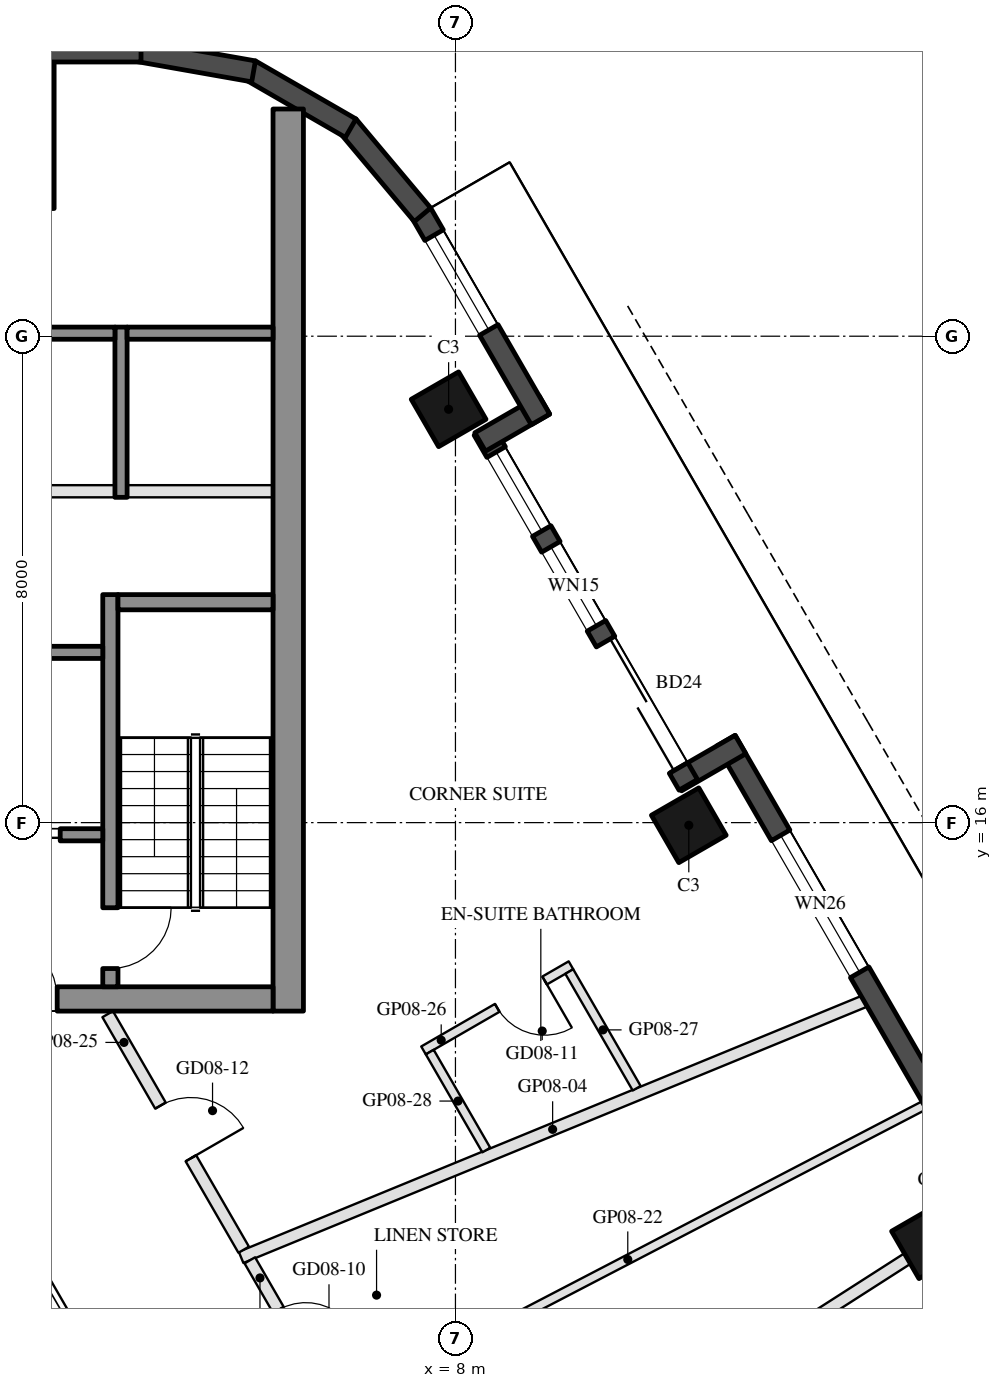
"""IFC4 building model, lengths in metres.
Left out: names, types, materials, properties, quantities, classifications, styles, units other than length and angle.
Written with IfcOpenShell. Run it as: python <this file> out.ifc"""

import sys

from ifc_helpers import new_model, si_unit, direction, frame, frame_2d, origin, origin_2d, place, context, subcontext, project, spatial, rectangle, hollow_rectangle, extrude, element, fill, save


model = new_model("IFC4")
c1 = context("Model", 3, precision=1e-05, world=origin(), true_north=direction((0.0, 1.0)))
c2 = subcontext(c1, "Body", "Model", "MODEL_VIEW")
j1 = project(units=[si_unit("LENGTHUNIT", "METRE"), si_unit("PLANEANGLEUNIT", "RADIAN")], contexts=[c1])
p1 = place(None, origin())
s1 = spatial("IfcSite", under=j1, at=p1, CompositionType="ELEMENT")
p2 = place(p1, origin())
s2 = spatial("IfcBuilding", under=s1, at=p2, CompositionType="ELEMENT")
p3 = place(p2, frame((0.0, 0.0, 105.7)))
s3 = spatial("IfcBuildingStorey", under=s2, at=p3, CompositionType="ELEMENT", Elevation=105.7)
for number, where, z_axis, x_axis in (
    (1, (15.788, 9.115, 0.0), (0.0, 0.0, 1.0), (-0.5, 0.866, 0.0)),
    (2, (11.838, 15.957, 0.0), (0.0, 0.0, 1.0), (-0.5, 0.866, 0.0)),
    (3, (7.888, 22.798, 0.0), (0.0, 0.0, 1.0), (-0.5, 0.866, 0.0)),
):
    element("IfcColumn", number, at=place(p3, frame(where, z_axis=z_axis, x_axis=x_axis)), inside=s3, PredefinedType="COLUMN", context=c2, shape_type="SweptSolid", body=[
        extrude(hollow_rectangle(XDim=0.9, YDim=0.9, WallThickness=0.04, at=origin_2d()), origin(), (0.0, 0.0, 1.0), 3.7),
    ])
p4 = place(p3, frame((0.0, 27.3, 0.0), z_axis=(0.0, 0.0, 1.0), x_axis=(1.0, 0.0, 0.0)))
e4 = element("IfcColumn", 4, at=p4, inside=s3, PredefinedType="COLUMN", context=c2, shape_type="SweptSolid", body=[
    extrude(hollow_rectangle(XDim=2.8, YDim=2.4, WallThickness=0.07, at=origin_2d()), origin(), (0.0, 0.0, 1.0), 3.7),
])
p5 = place(p3, frame((17.299, 8.948, 0.0), z_axis=(0.0, 0.0, 1.0), x_axis=(-0.500010041276, 0.866019606374, 0.0)))
e5 = element("IfcWall", 5, at=p5, inside=s3, PredefinedType="SOLIDWALL", context=c2, shape_type="SweptSolid", body=[
    extrude(rectangle(XDim=9.7, YDim=0.35, at=frame_2d((4.85, 0.0))), origin(), (0.0, 0.0, 1.0), 3.55),
])
p6 = place(p5, frame((5.301, 0.0, 0.3)))
e6 = element("IfcOpeningElement", 6, at=p6, cuts=e5, PredefinedType="OPENING", context=c2, shape_type="SweptSolid", body=[
    extrude(rectangle(XDim=2.6, YDim=2.65, at=frame_2d((1.3, 1.325))), frame((0.0, 0.185, 0.0), z_axis=(0.0, -1.0, 0.0), x_axis=(1.0, 0.0, 0.0)), (0.0, 0.0, 1.0), 0.37),
])
p7 = place(p3, frame((12.688, 17.284, 0.0), z_axis=(0.0, 0.0, 1.0), x_axis=(-0.865955602162, -0.500120880472, 0.0)))
e7 = element("IfcWall", 7, at=p7, inside=s3, PredefinedType="SOLIDWALL", context=c2, shape_type="SweptSolid", body=[
    extrude(rectangle(XDim=1.22, YDim=0.35, at=frame_2d((0.61, 0.0))), origin(), (0.0, 0.0, 1.0), 3.55),
])
p8 = place(p3, frame((11.829, 16.621, 0.0), z_axis=(0.0, 0.0, 1.0), x_axis=(-0.500003597184, 0.866023326939, 0.0)))
e8 = element("IfcWall", 8, at=p8, inside=s3, PredefinedType="SOLIDWALL", context=c2, shape_type="SweptSolid", body=[
    extrude(rectangle(XDim=6.74, YDim=0.35, at=frame_2d((3.37, 0.0))), origin(), (0.0, 0.0, 1.0), 3.55),
])
p9 = place(p8, frame((0.32, 0.0, 0.0)))
e9 = element("IfcOpeningElement", 9, at=p9, cuts=e8, PredefinedType="OPENING", context=c2, shape_type="SweptSolid", body=[
    extrude(rectangle(XDim=2.4, YDim=2.4, at=frame_2d((1.2, 1.2))), frame((0.0, 0.185, 0.0), z_axis=(0.0, -1.0, 0.0), x_axis=(1.0, 0.0, 0.0)), (0.0, 0.0, 1.0), 0.37),
])
p10 = place(p8, frame((3.02, 0.0, 0.3)))
e10 = element("IfcOpeningElement", 10, at=p10, cuts=e8, PredefinedType="OPENING", context=c2, shape_type="SweptSolid", body=[
    extrude(rectangle(XDim=1.5, YDim=2.65, at=frame_2d((0.75, 1.325))), frame((0.0, 0.185, 0.0), z_axis=(0.0, -1.0, 0.0), x_axis=(1.0, 0.0, 0.0)), (0.0, 0.0, 1.0), 0.37),
])
p11 = place(p8, frame((4.82, 0.0, 0.3)))
e11 = element("IfcOpeningElement", 11, at=p11, cuts=e8, PredefinedType="OPENING", context=c2, shape_type="SweptSolid", body=[
    extrude(rectangle(XDim=1.5, YDim=2.65, at=frame_2d((0.75, 1.325))), frame((0.0, 0.185, 0.0), z_axis=(0.0, -1.0, 0.0), x_axis=(1.0, 0.0, 0.0)), (0.0, 0.0, 1.0), 0.37),
])
p12 = place(p3, frame((8.406, 22.26, 0.0), z_axis=(0.0, 0.0, 1.0), x_axis=(0.865955602162, 0.500120880472, 0.0)))
e12 = element("IfcWall", 12, at=p12, inside=s3, PredefinedType="SOLIDWALL", context=c2, shape_type="SweptSolid", body=[
    extrude(rectangle(XDim=1.22, YDim=0.35, at=frame_2d((0.61, 0.0))), origin(), (0.0, 0.0, 1.0), 3.55),
])
p13 = place(p3, frame((9.398, 22.631, 0.0), z_axis=(0.0, 0.0, 1.0), x_axis=(-0.499954521343, 0.866051659307, 0.0)))
e13 = element("IfcWall", 13, at=p13, inside=s3, PredefinedType="SOLIDWALL", context=c2, shape_type="SweptSolid", body=[
    extrude(rectangle(XDim=3.916, YDim=0.35, at=frame_2d((1.958, 0.0))), origin(), (0.0, 0.0, 1.0), 3.55),
])
p14 = place(p13, frame((1.7, 0.0, 0.3)))
e14 = element("IfcOpeningElement", 14, at=p14, cuts=e13, PredefinedType="OPENING", context=c2, shape_type="SweptSolid", body=[
    extrude(rectangle(XDim=1.8, YDim=2.65, at=frame_2d((0.9, 1.325))), frame((0.0, 0.185, 0.0), z_axis=(0.0, -1.0, 0.0), x_axis=(1.0, 0.0, 0.0)), (0.0, 0.0, 1.0), 0.37),
])
p15 = place(p3, frame((7.458, 25.998, 0.0), z_axis=(0.0, 0.0, 1.0), x_axis=(-0.642808304945, 0.766027077259, 0.0)))
e15 = element("IfcWall", 15, at=p15, inside=s3, PredefinedType="SOLIDWALL", context=c2, shape_type="SweptSolid", body=[
    extrude(rectangle(XDim=1.91, YDim=0.35, at=frame_2d((0.955, 0.0))), origin(), (0.0, 0.0, 1.0), 3.55),
])
for number, where, z_axis, x_axis in (
    (16, (6.277, 27.422, 0.0), (0.0, 0.0, 1.0), (-0.866, 0.5, 0.0)),
    (17, (4.68, 28.356, 0.0), (0.0, 0.0, 1.0), (-0.985, 0.174, 0.0)),
):
    element("IfcWall", number, at=place(p3, frame(where, z_axis=z_axis, x_axis=x_axis)), inside=s3, PredefinedType="SOLIDWALL", context=c2, shape_type="SweptSolid", body=[
        extrude(rectangle(XDim=1.91, YDim=0.35, at=frame_2d((0.955, 0.0))), origin(), (0.0, 0.0, 1.0), 3.55),
    ])
p16 = place(p3, frame((2.829, 28.685, 0.0), z_axis=(0.0, 0.0, 1.0), x_axis=(-1.0, 0.0, 0.0)))
e18 = element("IfcWall", 18, at=p16, inside=s3, PredefinedType="SOLIDWALL", context=c2, shape_type="SweptSolid", body=[
    extrude(rectangle(XDim=5.658, YDim=0.35, at=frame_2d((2.829, 0.0))), origin(), (0.0, 0.0, 1.0), 3.55),
])
p17 = place(p3, frame((5.25, 12.9, 0.0), z_axis=(0.0, 0.0, 1.0), x_axis=(0.0, 1.0, 0.0)))
e19 = element("IfcWall", 19, at=p17, inside=s3, PredefinedType="SHEAR", context=c2, shape_type="SweptSolid", body=[
    extrude(rectangle(XDim=14.837, YDim=0.5, at=frame_2d((7.418, 0.0))), origin(), (0.0, 0.0, 1.0), 3.5),
])
p18 = place(p3, frame((5.0, 13.1, 0.0), z_axis=(0.0, 0.0, 1.0), x_axis=(-1.0, 0.0, 0.0)))
e20 = element("IfcWall", 20, at=p18, inside=s3, PredefinedType="SHEAR", context=c2, shape_type="SweptSolid", body=[
    extrude(rectangle(XDim=10.0, YDim=0.4, at=frame_2d((5.0, 0.0))), origin(), (0.0, 0.0, 1.0), 3.5),
])
p19 = place(p18, frame((3.55, 0.0, 0.0)))
e21 = element("IfcOpeningElement", 21, at=p19, cuts=e20, PredefinedType="OPENING", context=c2, shape_type="SweptSolid", body=[
    extrude(rectangle(XDim=1.1, YDim=2.1, at=frame_2d((0.55, 1.05))), frame((0.0, 0.21, 0.0), z_axis=(0.0, -1.0, 0.0), x_axis=(1.0, 0.0, 0.0)), (0.0, 0.0, 1.0), 0.42),
])
p20 = place(p18, frame((5.85, 0.0, 0.0)))
e22 = element("IfcOpeningElement", 22, at=p20, cuts=e20, PredefinedType="OPENING", context=c2, shape_type="SweptSolid", body=[
    extrude(rectangle(XDim=1.4, YDim=2.1, at=frame_2d((0.7, 1.05))), frame((0.0, 0.21, 0.0), z_axis=(0.0, -1.0, 0.0), x_axis=(1.0, 0.0, 0.0)), (0.0, 0.0, 1.0), 0.42),
])
p21 = place(p3, frame((2.325, 13.3, 0.0), z_axis=(0.0, 0.0, 1.0), x_axis=(0.0, 1.0, 0.0)))
e23 = element("IfcWall", 23, at=p21, inside=s3, PredefinedType="SHEAR", context=c2, shape_type="SweptSolid", body=[
    extrude(rectangle(XDim=6.45, YDim=0.25, at=frame_2d((3.225, 0.0))), origin(), (0.0, 0.0, 1.0), 3.5),
])
p22 = place(p21, frame((0.3, 0.0, 0.0)))
e24 = element("IfcOpeningElement", 24, at=p22, cuts=e23, PredefinedType="OPENING", context=c2, shape_type="SweptSolid", body=[
    extrude(rectangle(XDim=1.0, YDim=2.1, at=frame_2d((0.5, 1.05))), frame((0.0, 0.135, 0.0), z_axis=(0.0, -1.0, 0.0), x_axis=(1.0, 0.0, 0.0)), (0.0, 0.0, 1.0), 0.27),
])
p23 = place(p3, frame((5.0, 19.625, 0.0), z_axis=(0.0, 0.0, 1.0), x_axis=(-1.0, 0.0, 0.0)))
e25 = element("IfcWall", 25, at=p23, inside=s3, PredefinedType="SHEAR", context=c2, shape_type="SweptSolid", body=[
    extrude(rectangle(XDim=2.55, YDim=0.25, at=frame_2d((1.275, 0.0))), origin(), (0.0, 0.0, 1.0), 3.5),
])
p24 = place(p3, frame((2.2, 18.8, 0.0), z_axis=(0.0, 0.0, 1.0), x_axis=(-1.0, 0.0, 0.0)))
e26 = element("IfcWall", 26, at=p24, inside=s3, PredefinedType="SHEAR", context=c2, shape_type="SweptSolid", body=[
    extrude(rectangle(XDim=2.8, YDim=0.2, at=frame_2d((1.4, 0.0))), origin(), (0.0, 0.0, 1.0), 3.5),
])
p25 = place(p3, frame((2.2, 15.8, 0.0), z_axis=(0.0, 0.0, 1.0), x_axis=(-1.0, 0.0, 0.0)))
e27 = element("IfcWall", 27, at=p25, inside=s3, PredefinedType="SHEAR", context=c2, shape_type="SweptSolid", body=[
    extrude(rectangle(XDim=2.8, YDim=0.2, at=frame_2d((1.4, 0.0))), origin(), (0.0, 0.0, 1.0), 3.5),
])
p26 = place(p25, frame((0.7, 0.0, 0.0)))
e28 = element("IfcOpeningElement", 28, at=p26, cuts=e27, PredefinedType="OPENING", context=c2, shape_type="SweptSolid", body=[
    extrude(rectangle(XDim=1.2, YDim=2.1, at=frame_2d((0.6, 1.05))), frame((0.0, 0.11, 0.0), z_axis=(0.0, -1.0, 0.0), x_axis=(1.0, 0.0, 0.0)), (0.0, 0.0, 1.0), 0.22),
])
p27 = place(p3, frame((2.5, 21.35, 0.0), z_axis=(0.0, 0.0, 1.0), x_axis=(0.0, 1.0, 0.0)))
e29 = element("IfcWall", 29, at=p27, inside=s3, PredefinedType="SHEAR", context=c2, shape_type="SweptSolid", body=[
    extrude(rectangle(XDim=2.8, YDim=0.2, at=frame_2d((1.4, 0.0))), origin(), (0.0, 0.0, 1.0), 3.5),
])
p28 = place(p3, frame((5.0, 24.05, 0.0), z_axis=(0.0, 0.0, 1.0), x_axis=(-1.0, 0.0, 0.0)))
e30 = element("IfcWall", 30, at=p28, inside=s3, PredefinedType="SHEAR", context=c2, shape_type="SweptSolid", body=[
    extrude(rectangle(XDim=2.4, YDim=0.2, at=frame_2d((1.2, 0.0))), origin(), (0.0, 0.0, 1.0), 3.5),
])
p29 = place(p3, frame((2.4, 24.05, 0.0), z_axis=(0.0, 0.0, 1.0), x_axis=(-1.0, 0.0, 0.0)))
e31 = element("IfcWall", 31, at=p29, inside=s3, PredefinedType="SHEAR", context=c2, shape_type="SweptSolid", body=[
    extrude(rectangle(XDim=2.8, YDim=0.2, at=frame_2d((1.4, 0.0))), origin(), (0.0, 0.0, 1.0), 3.5),
])
p30 = place(p3, frame((5.0, 21.45, 0.0), z_axis=(0.0, 0.0, 1.0), x_axis=(-1.0, 0.0, 0.0)))
e32 = element("IfcWall", 32, at=p30, inside=s3, PredefinedType="PARTITIONING", context=c2, shape_type="SweptSolid", body=[
    extrude(rectangle(XDim=2.4, YDim=0.2, at=frame_2d((1.2, 0.0))), origin(), (0.0, 0.0, 1.0), 3.5),
])
p31 = place(p3, frame((2.4, 21.45, 0.0), z_axis=(0.0, 0.0, 1.0), x_axis=(-1.0, 0.0, 0.0)))
e33 = element("IfcWall", 33, at=p31, inside=s3, PredefinedType="PARTITIONING", context=c2, shape_type="SweptSolid", body=[
    extrude(rectangle(XDim=2.8, YDim=0.2, at=frame_2d((1.4, 0.0))), origin(), (0.0, 0.0, 1.0), 3.5),
])
p32 = place(p3, frame((15.433, 8.83, 0.0), z_axis=(0.0, 0.0, 1.0), x_axis=(-0.841935777146, -0.539577748949, 0.0)))
e34 = element("IfcWall", 34, at=p32, inside=s3, PredefinedType="PARTITIONING", context=c2, shape_type="SweptSolid", body=[
    extrude(rectangle(XDim=9.49, YDim=0.2, at=frame_2d((4.745, 0.0))), origin(), (0.0, 0.0, 1.0), 2.95),
])
p33 = place(p3, frame((14.722, 13.061, 0.0), z_axis=(0.0, 0.0, 1.0), x_axis=(-0.9249494111, -0.380090235214, 0.0)))
e35 = element("IfcWall", 35, at=p33, inside=s3, PredefinedType="PARTITIONING", context=c2, shape_type="SweptSolid", body=[
    extrude(rectangle(XDim=11.079, YDim=0.2, at=frame_2d((5.54, 0.0))), origin(), (0.0, 0.0, 1.0), 2.95),
])
p34 = place(p3, frame((15.709, 11.35, 0.0), z_axis=(0.0, 0.0, 1.0), x_axis=(-0.887196797294, -0.461391203721, 0.0)))
e36 = element("IfcWall", 36, at=p34, inside=s3, PredefinedType="PARTITIONING", context=c2, shape_type="SweptSolid", body=[
    extrude(rectangle(XDim=10.991, YDim=0.15, at=frame_2d((5.495, 0.0))), origin(), (0.0, 0.0, 1.0), 2.96),
])
p35 = place(p3, frame((4.618, 8.801, 0.0), z_axis=(0.0, 0.0, 1.0), x_axis=(0.499988210251, -0.866032210492, 0.0)))
e37 = element("IfcWall", 37, at=p35, inside=s3, PredefinedType="PARTITIONING", context=c2, shape_type="SweptSolid", body=[
    extrude(rectangle(XDim=2.783, YDim=0.2, at=frame_2d((1.392, 0.0))), origin(), (0.0, 0.0, 1.0), 2.95),
])
p36 = place(p35, frame((0.942, 0.0, 0.0)))
e38 = element("IfcOpeningElement", 38, at=p36, cuts=e37, PredefinedType="OPENING", context=c2, shape_type="SweptSolid", body=[
    extrude(rectangle(XDim=0.9, YDim=2.1, at=frame_2d((0.45, 1.05))), frame((0.0, 0.11, 0.0), z_axis=(0.0, -1.0, 0.0), x_axis=(1.0, 0.0, 0.0)), (0.0, 0.0, 1.0), 0.22),
])
p37 = place(p3, frame((2.281, 12.85, 0.0), z_axis=(0.0, 0.0, 1.0), x_axis=(0.499977539641, -0.866038370891, 0.0)))
e39 = element("IfcWall", 39, at=p37, inside=s3, PredefinedType="PARTITIONING", context=c2, shape_type="SweptSolid", body=[
    extrude(rectangle(XDim=4.474, YDim=0.2, at=frame_2d((2.237, 0.0))), origin(), (0.0, 0.0, 1.0), 2.95),
])
p38 = place(p37, frame((1.737, 0.0, 0.0)))
e40 = element("IfcOpeningElement", 40, at=p38, cuts=e39, PredefinedType="OPENING", context=c2, shape_type="SweptSolid", body=[
    extrude(rectangle(XDim=1.0, YDim=2.1, at=frame_2d((0.5, 1.05))), frame((0.0, 0.11, 0.0), z_axis=(0.0, -1.0, 0.0), x_axis=(1.0, 0.0, 0.0)), (0.0, 0.0, 1.0), 0.22),
])
p39 = place(p3, frame((9.9, 13.653, 0.0), z_axis=(0.0, 0.0, 1.0), x_axis=(-0.866056369097, -0.49994636267, 0.0)))
e41 = element("IfcWall", 41, at=p39, inside=s3, PredefinedType="PARTITIONING", context=c2, shape_type="SweptSolid", body=[
    extrude(rectangle(XDim=2.8, YDim=0.15, at=frame_2d((1.4, 0.0))), origin(), (0.0, 0.0, 1.0), 3.55),
])
p40 = place(p39, frame((0.5, 0.0, 0.0)))
e42 = element("IfcOpeningElement", 42, at=p40, cuts=e41, PredefinedType="OPENING", context=c2, shape_type="SweptSolid", body=[
    extrude(rectangle(XDim=0.9, YDim=2.1, at=frame_2d((0.45, 1.05))), frame((0.0, 0.085, 0.0), z_axis=(0.0, -1.0, 0.0), x_axis=(1.0, 0.0, 0.0)), (0.0, 0.0, 1.0), 0.17),
])
p41 = place(p3, frame((10.98, 11.631, 0.0), z_axis=(0.0, 0.0, 1.0), x_axis=(-0.500024353964, 0.86601134256, 0.0)))
e43 = element("IfcWall", 43, at=p41, inside=s3, PredefinedType="PARTITIONING", context=c2, shape_type="SweptSolid", body=[
    extrude(rectangle(XDim=2.217, YDim=0.15, at=frame_2d((1.108, 0.0))), origin(), (0.0, 0.0, 1.0), 3.55),
])
p42 = place(p3, frame((8.507, 10.615, 0.0), z_axis=(0.0, 0.0, 1.0), x_axis=(-0.499908018857, 0.866078502609, 0.0)))
e44 = element("IfcWall", 44, at=p42, inside=s3, PredefinedType="PARTITIONING", context=c2, shape_type="SweptSolid", body=[
    extrude(rectangle(XDim=1.86, YDim=0.15, at=frame_2d((0.93, 0.0))), origin(), (0.0, 0.0, 1.0), 3.55),
])
p43 = place(p6, origin())
e45 = element("IfcWindow", 45, at=p43, inside=s3, PartitioningType="SINGLE_PANEL", PredefinedType="WINDOW", context=c2, shape_type="SweptSolid", body=[
    extrude(rectangle(XDim=2.6, YDim=2.65, at=frame_2d((1.3, 1.325))), frame((0.0, 0.03, 0.0), z_axis=(0.0, -1.0, 0.0), x_axis=(1.0, 0.0, 0.0)), (0.0, 0.0, 1.0), 0.06),
])
fill(e6, e45)
p44 = place(p9, frame((2.4, 0.0, 0.0), z_axis=(0.0, 0.0, 1.0), x_axis=(-1.0, 0.0, 0.0)))
e46 = element("IfcDoor", 46, at=p44, inside=s3, OperationType="SLIDING_TO_LEFT", PredefinedType="DOOR", context=c2, shape_type="SweptSolid", body=[
    extrude(rectangle(XDim=2.4, YDim=2.4, at=frame_2d((1.2, 1.2))), frame((0.0, 0.025, 0.0), z_axis=(0.0, -1.0, 0.0), x_axis=(1.0, 0.0, 0.0)), (0.0, 0.0, 1.0), 0.05),
])
fill(e9, e46)
p45 = place(p10, origin())
e47 = element("IfcWindow", 47, at=p45, inside=s3, PartitioningType="SINGLE_PANEL", PredefinedType="WINDOW", context=c2, shape_type="SweptSolid", body=[
    extrude(rectangle(XDim=1.5, YDim=2.65, at=frame_2d((0.75, 1.325))), frame((0.0, 0.03, 0.0), z_axis=(0.0, -1.0, 0.0), x_axis=(1.0, 0.0, 0.0)), (0.0, 0.0, 1.0), 0.06),
])
fill(e10, e47)
p46 = place(p11, origin())
e48 = element("IfcWindow", 48, at=p46, inside=s3, PartitioningType="SINGLE_PANEL", PredefinedType="WINDOW", context=c2, shape_type="SweptSolid", body=[
    extrude(rectangle(XDim=1.5, YDim=2.65, at=frame_2d((0.75, 1.325))), frame((0.0, 0.03, 0.0), z_axis=(0.0, -1.0, 0.0), x_axis=(1.0, 0.0, 0.0)), (0.0, 0.0, 1.0), 0.06),
])
fill(e11, e48)
p47 = place(p14, origin())
e49 = element("IfcWindow", 49, at=p47, inside=s3, PartitioningType="SINGLE_PANEL", PredefinedType="WINDOW", context=c2, shape_type="SweptSolid", body=[
    extrude(rectangle(XDim=1.8, YDim=2.65, at=frame_2d((0.9, 1.325))), frame((0.0, 0.03, 0.0), z_axis=(0.0, -1.0, 0.0), x_axis=(1.0, 0.0, 0.0)), (0.0, 0.0, 1.0), 0.06),
])
fill(e14, e49)
p48 = place(p26, origin())
e50 = element("IfcDoor", 50, at=p48, inside=s3, OperationType="DOUBLE_DOOR_SLIDING", PredefinedType="DOOR", context=c2, shape_type="SweptSolid", body=[
    extrude(rectangle(XDim=1.2, YDim=2.1, at=frame_2d((0.6, 1.05))), frame((0.0, 0.025, 0.0), z_axis=(0.0, -1.0, 0.0), x_axis=(1.0, 0.0, 0.0)), (0.0, 0.0, 1.0), 0.05),
])
fill(e28, e50)
p49 = place(p19, frame((1.1, 0.0, 0.0), z_axis=(0.0, 0.0, 1.0), x_axis=(-1.0, 0.0, 0.0)))
e51 = element("IfcDoor", 51, at=p49, inside=s3, OperationType="SINGLE_SWING_LEFT", PredefinedType="DOOR", context=c2, shape_type="SweptSolid", body=[
    extrude(rectangle(XDim=1.1, YDim=2.1, at=frame_2d((0.55, 1.05))), frame((0.0, 0.025, 0.0), z_axis=(0.0, -1.0, 0.0), x_axis=(1.0, 0.0, 0.0)), (0.0, 0.0, 1.0), 0.05),
])
fill(e21, e51)
p50 = place(p22, frame((1.0, 0.0, 0.0), z_axis=(0.0, 0.0, 1.0), x_axis=(-1.0, 0.0, 0.0)))
e52 = element("IfcDoor", 52, at=p50, inside=s3, OperationType="SINGLE_SWING_LEFT", PredefinedType="DOOR", context=c2, shape_type="SweptSolid", body=[
    extrude(rectangle(XDim=1.0, YDim=2.1, at=frame_2d((0.5, 1.05))), frame((0.0, 0.025, 0.0), z_axis=(0.0, -1.0, 0.0), x_axis=(1.0, 0.0, 0.0)), (0.0, 0.0, 1.0), 0.05),
])
fill(e24, e52)
p51 = place(p40, origin())
e53 = element("IfcDoor", 53, at=p51, inside=s3, OperationType="SINGLE_SWING_LEFT", PredefinedType="DOOR", context=c2, shape_type="SweptSolid", body=[
    extrude(rectangle(XDim=0.9, YDim=2.1, at=frame_2d((0.45, 1.05))), frame((0.0, 0.025, 0.0), z_axis=(0.0, -1.0, 0.0), x_axis=(1.0, 0.0, 0.0)), (0.0, 0.0, 1.0), 0.05),
])
fill(e42, e53)
p52 = place(p38, origin())
e54 = element("IfcDoor", 54, at=p52, inside=s3, OperationType="SINGLE_SWING_RIGHT", PredefinedType="DOOR", context=c2, shape_type="SweptSolid", body=[
    extrude(rectangle(XDim=1.0, YDim=2.1, at=frame_2d((0.5, 1.05))), frame((0.0, 0.025, 0.0), z_axis=(0.0, -1.0, 0.0), x_axis=(1.0, 0.0, 0.0)), (0.0, 0.0, 1.0), 0.05),
])
fill(e40, e54)
save(model, sys.argv[1])
